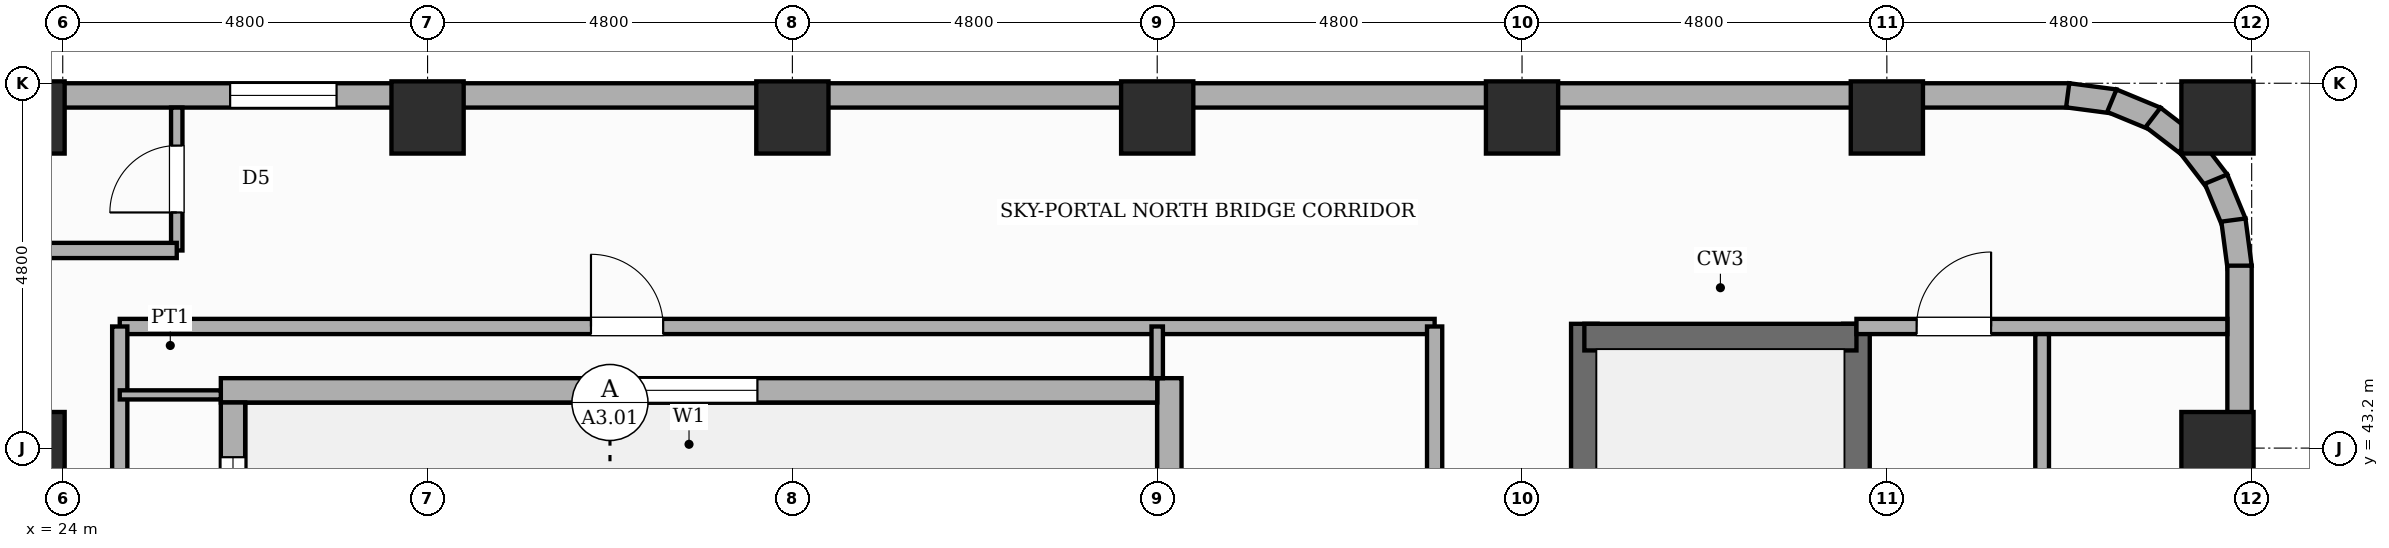
"""IFC4 building model, lengths in metres.
Left out: names, types, materials, properties, quantities, classifications, styles, units other than length and angle.
Written with IfcOpenShell. Run it as: python <this file> out.ifc"""

import sys

from ifc_helpers import new_model, si_unit, direction, frame, frame_2d, origin, origin_2d, place, context, subcontext, project, spatial, rectangle, extrude, element, fill, save


model = new_model("IFC4")
c1 = context("Model", 3, precision=1e-05, world=origin(), true_north=direction((0.0, 1.0)))
c2 = subcontext(c1, "Body", "Model", "MODEL_VIEW")
j1 = project(units=[si_unit("LENGTHUNIT", "METRE"), si_unit("PLANEANGLEUNIT", "RADIAN")], contexts=[c1])
p1 = place(None, origin())
s1 = spatial("IfcSite", under=j1, at=p1, CompositionType="ELEMENT")
p2 = place(p1, origin())
s2 = spatial("IfcBuilding", under=s1, at=p2, CompositionType="ELEMENT")
p3 = place(p2, frame((0.0, 0.0, 154.0)))
s3 = spatial("IfcBuildingStorey", under=s2, at=p3, CompositionType="ELEMENT", Elevation=154.0)
p4 = place(p3, frame((44.02, 35.865, 0.0), z_axis=(0.0, 0.0, 1.0), x_axis=(0.0, 1.0, 0.0)))
e1 = element("IfcWall", 1, at=p4, inside=s3, PredefinedType="SHEAR", context=c2, shape_type="SweptSolid", body=[
    extrude(rectangle(XDim=8.97, YDim=0.35, at=frame_2d((4.485, 0.0))), origin(), (0.0, 0.0, 1.0), 3.6),
])
p5 = place(p4, frame((0.65, 0.0, 0.0)))
e2 = element("IfcOpeningElement", 2, at=p5, cuts=e1, PredefinedType="OPENING", context=c2, shape_type="SweptSolid", body=[
    extrude(rectangle(XDim=0.95, YDim=2.1, at=frame_2d((0.475, 1.05))), frame((0.0, 0.185, 0.0), z_axis=(0.0, -1.0, 0.0), x_axis=(1.0, 0.0, 0.0)), (0.0, 0.0, 1.0), 0.37),
])
p6 = place(p3, frame((47.6, 35.865, 0.0), z_axis=(0.0, 0.0, 1.0), x_axis=(0.0, 1.0, 0.0)))
e3 = element("IfcWall", 3, at=p6, inside=s3, PredefinedType="SHEAR", context=c2, shape_type="SweptSolid", body=[
    extrude(rectangle(XDim=8.97, YDim=0.35, at=frame_2d((4.485, 0.0))), origin(), (0.0, 0.0, 1.0), 3.6),
])
p7 = place(p3, frame((44.02, 44.66, 0.0), z_axis=(0.0, 0.0, 1.0), x_axis=(1.0, 0.0, 0.0)))
e4 = element("IfcWall", 4, at=p7, inside=s3, PredefinedType="SHEAR", context=c2, shape_type="SweptSolid", body=[
    extrude(rectangle(XDim=3.58, YDim=0.35, at=frame_2d((1.79, 0.0))), origin(), (0.0, 0.0, 1.0), 3.6),
])
for number, where, z_axis, x_axis in (
    (5, (23.55, 43.2, 0.0), (0.0, 0.0, 1.0), (1.0, 0.0, 0.0)),
    (6, (23.55, 47.55, 0.0), (0.0, 0.0, 1.0), (1.0, 0.0, 0.0)),
    (7, (28.8, 47.55, 0.0), (0.0, 0.0, 1.0), (1.0, 0.0, 0.0)),
    (8, (33.6, 47.55, 0.0), (0.0, 0.0, 1.0), (1.0, 0.0, 0.0)),
    (9, (38.4, 47.55, 0.0), (0.0, 0.0, 1.0), (1.0, 0.0, 0.0)),
    (10, (43.2, 47.55, 0.0), (0.0, 0.0, 1.0), (1.0, 0.0, 0.0)),
    (11, (48.0, 47.55, 0.0), (0.0, 0.0, 1.0), (1.0, 0.0, 0.0)),
    (12, (52.35, 43.2, 0.0), (0.0, 0.0, 1.0), (1.0, 0.0, 0.0)),
    (13, (52.35, 47.55, 0.0), (0.0, 0.0, 1.0), (1.0, 0.0, 0.0)),
):
    element("IfcColumn", number, at=place(p3, frame(where, z_axis=z_axis, x_axis=x_axis)), inside=s3, PredefinedType="COLUMN", context=c2, shape_type="SweptSolid", body=[
        extrude(rectangle(XDim=0.95, YDim=0.95, at=origin_2d()), origin(), (0.0, 0.0, 1.0), 3.6),
    ])
p8 = place(p3, frame((7.2, 47.84, 0.0), z_axis=(0.0, 0.0, 1.0), x_axis=(1.0, 0.0, 0.0)))
e14 = element("IfcWall", 14, at=p8, inside=s3, PredefinedType="STANDARD", context=c2, shape_type="SweptSolid", body=[
    extrude(rectangle(XDim=43.2, YDim=0.32, at=frame_2d((21.6, 0.0))), origin(), (0.0, 0.0, 1.0), 2.54),
])
p9 = place(p8, frame((19.002, 0.0, 0.65)))
e15 = element("IfcOpeningElement", 15, at=p9, cuts=e14, PredefinedType="OPENING", context=c2, shape_type="SweptSolid", body=[
    extrude(rectangle(XDim=1.4, YDim=1.1, at=frame_2d((0.7, 0.55))), frame((0.0, 0.17, 0.0), z_axis=(0.0, -1.0, 0.0), x_axis=(1.0, 0.0, 0.0)), (0.0, 0.0, 1.0), 0.34),
])
p10 = place(p8, frame((0.282, 0.0, 0.65)))
e16 = element("IfcOpeningElement", 16, at=p10, cuts=e14, PredefinedType="OPENING", context=c2, shape_type="SweptSolid", body=[
    extrude(rectangle(XDim=1.4, YDim=1.1, at=frame_2d((0.7, 0.55))), frame((0.0, 0.17, 0.0), z_axis=(0.0, -1.0, 0.0), x_axis=(1.0, 0.0, 0.0)), (0.0, 0.0, 1.0), 0.34),
])
p11 = place(p8, frame((5.478, 0.0, 0.45)))
e17 = element("IfcOpeningElement", 17, at=p11, cuts=e14, PredefinedType="OPENING", context=c2, shape_type="SweptSolid", body=[
    extrude(rectangle(XDim=0.95, YDim=1.8, at=frame_2d((0.475, 0.9))), frame((0.0, 0.17, 0.0), z_axis=(0.0, -1.0, 0.0), x_axis=(1.0, 0.0, 0.0)), (0.0, 0.0, 1.0), 0.34),
])
for number, where, z_axis, x_axis in (
    (18, (50.379, 47.841, 0.0), (0.0, 0.0, 1.0), (0.991, -0.131, 0.0)),
    (19, (50.96, 47.771, 0.0), (0.0, 0.0, 1.0), (0.924, -0.383, 0.0)),
    (20, (51.503, 47.552, 0.0), (0.0, 0.0, 1.0), (0.793, -0.609, 0.0)),
    (21, (51.97, 47.2, 0.0), (0.0, 0.0, 1.0), (0.609, -0.793, 0.0)),
    (22, (52.331, 46.739, 0.0), (0.0, 0.0, 1.0), (0.382, -0.924, 0.0)),
    (23, (52.56, 46.2, 0.0), (0.0, 0.0, 1.0), (0.131, -0.991, 0.0)),
):
    element("IfcWall", number, at=place(p3, frame(where, z_axis=z_axis, x_axis=x_axis)), inside=s3, PredefinedType="STANDARD", context=c2, shape_type="SweptSolid", body=[
        extrude(rectangle(XDim=0.626, YDim=0.32, at=frame_2d((0.313, 0.0))), origin(), (0.0, 0.0, 1.0), 2.54),
    ])
p12 = place(p3, frame((52.64, 45.6, 0.0), z_axis=(0.0, 0.0, 1.0), x_axis=(0.0, -1.0, 0.0)))
e24 = element("IfcWall", 24, at=p12, inside=s3, PredefinedType="STANDARD", context=c2, shape_type="SweptSolid", body=[
    extrude(rectangle(XDim=14.4, YDim=0.32, at=frame_2d((7.2, 0.0))), origin(), (0.0, 0.0, 1.0), 2.54),
])
p13 = place(p12, frame((3.75, 0.0, 0.0)))
e25 = element("IfcOpeningElement", 25, at=p13, cuts=e24, PredefinedType="OPENING", context=c2, shape_type="SweptSolid", body=[
    extrude(rectangle(XDim=1.1, YDim=2.15, at=frame_2d((0.55, 1.075))), frame((0.0, 0.17, 0.0), z_axis=(0.0, -1.0, 0.0), x_axis=(1.0, 0.0, 0.0)), (0.0, 0.0, 1.0), 0.34),
])
p14 = place(p12, frame((10.52, 0.0, 0.45)))
e26 = element("IfcOpeningElement", 26, at=p14, cuts=e24, PredefinedType="OPENING", context=c2, shape_type="SweptSolid", body=[
    extrude(rectangle(XDim=0.75, YDim=1.8, at=frame_2d((0.375, 0.9))), frame((0.0, 0.17, 0.0), z_axis=(0.0, -1.0, 0.0), x_axis=(1.0, 0.0, 0.0)), (0.0, 0.0, 1.0), 0.34),
])
p15 = place(p12, frame((5.486, 0.0, 0.45)))
e27 = element("IfcOpeningElement", 27, at=p15, cuts=e24, PredefinedType="OPENING", context=c2, shape_type="SweptSolid", body=[
    extrude(rectangle(XDim=0.95, YDim=1.8, at=frame_2d((0.475, 0.9))), frame((0.0, 0.17, 0.0), z_axis=(0.0, -1.0, 0.0), x_axis=(1.0, 0.0, 0.0)), (0.0, 0.0, 1.0), 0.34),
])
p16 = place(p3, frame((38.56, 28.8, 0.0), z_axis=(0.0, 0.0, 1.0), x_axis=(0.0, 1.0, 0.0)))
e28 = element("IfcWall", 28, at=p16, inside=s3, PredefinedType="STANDARD", context=c2, shape_type="SweptSolid", body=[
    extrude(rectangle(XDim=15.32, YDim=0.32, at=frame_2d((7.66, 0.0))), origin(), (0.0, 0.0, 1.0), 3.36),
])
p17 = place(p16, frame((10.99, 0.0, 0.8)))
e29 = element("IfcOpeningElement", 29, at=p17, cuts=e28, PredefinedType="OPENING", context=c2, shape_type="SweptSolid", body=[
    extrude(rectangle(XDim=1.8, YDim=2.1, at=frame_2d((0.9, 1.05))), frame((0.0, 0.17, 0.0), z_axis=(0.0, -1.0, 0.0), x_axis=(1.0, 0.0, 0.0)), (0.0, 0.0, 1.0), 0.34),
])
p18 = place(p16, frame((3.45, 0.0, 0.8)))
e30 = element("IfcOpeningElement", 30, at=p18, cuts=e28, PredefinedType="OPENING", context=c2, shape_type="SweptSolid", body=[
    extrude(rectangle(XDim=1.8, YDim=2.1, at=frame_2d((0.9, 1.05))), frame((0.0, 0.17, 0.0), z_axis=(0.0, -1.0, 0.0), x_axis=(1.0, 0.0, 0.0)), (0.0, 0.0, 1.0), 0.34),
])
p19 = place(p3, frame((38.4, 43.96, 0.0), z_axis=(0.0, 0.0, 1.0), x_axis=(-1.0, 0.0, 0.0)))
e31 = element("IfcWall", 31, at=p19, inside=s3, PredefinedType="STANDARD", context=c2, shape_type="SweptSolid", body=[
    extrude(rectangle(XDim=12.32, YDim=0.32, at=frame_2d((6.16, 0.0))), origin(), (0.0, 0.0, 1.0), 3.36),
])
p20 = place(p19, frame((5.26, 0.0, 0.8)))
e32 = element("IfcOpeningElement", 32, at=p20, cuts=e31, PredefinedType="OPENING", context=c2, shape_type="SweptSolid", body=[
    extrude(rectangle(XDim=1.8, YDim=2.1, at=frame_2d((0.9, 1.05))), frame((0.0, 0.17, 0.0), z_axis=(0.0, -1.0, 0.0), x_axis=(1.0, 0.0, 0.0)), (0.0, 0.0, 1.0), 0.34),
])
p21 = place(p3, frame((26.24, 43.8, 0.0), z_axis=(0.0, 0.0, 1.0), x_axis=(0.0, -1.0, 0.0)))
e33 = element("IfcWall", 33, at=p21, inside=s3, PredefinedType="STANDARD", context=c2, shape_type="SweptSolid", body=[
    extrude(rectangle(XDim=15.0, YDim=0.32, at=frame_2d((7.5, 0.0))), origin(), (0.0, 0.0, 1.0), 3.36),
])
p22 = place(p21, frame((8.15, 0.0, 0.0)))
e34 = element("IfcOpeningElement", 34, at=p22, cuts=e33, PredefinedType="OPENING", context=c2, shape_type="SweptSolid", body=[
    extrude(rectangle(XDim=1.3, YDim=2.2, at=frame_2d((0.65, 1.1))), frame((0.0, 0.17, 0.0), z_axis=(0.0, -1.0, 0.0), x_axis=(1.0, 0.0, 0.0)), (0.0, 0.0, 1.0), 0.34),
])
p23 = place(p21, frame((4.735, 0.0, 0.8)))
e35 = element("IfcOpeningElement", 35, at=p23, cuts=e33, PredefinedType="OPENING", context=c2, shape_type="SweptSolid", body=[
    extrude(rectangle(XDim=1.8, YDim=2.1, at=frame_2d((0.9, 1.05))), frame((0.0, 0.17, 0.0), z_axis=(0.0, -1.0, 0.0), x_axis=(1.0, 0.0, 0.0)), (0.0, 0.0, 1.0), 0.34),
])
p24 = place(p21, frame((0.72, 0.0, 0.8)))
e36 = element("IfcOpeningElement", 36, at=p24, cuts=e33, PredefinedType="OPENING", context=c2, shape_type="SweptSolid", body=[
    extrude(rectangle(XDim=1.8, YDim=2.1, at=frame_2d((0.9, 1.05))), frame((0.0, 0.17, 0.0), z_axis=(0.0, -1.0, 0.0), x_axis=(1.0, 0.0, 0.0)), (0.0, 0.0, 1.0), 0.34),
])
p25 = place(p3, frame((25.5, 45.8, 0.0), z_axis=(0.0, 0.0, 1.0), x_axis=(0.0, 1.0, 0.0)))
e37 = element("IfcWall", 37, at=p25, inside=s3, PredefinedType="PARTITIONING", context=c2, shape_type="SweptSolid", body=[
    extrude(rectangle(XDim=1.88, YDim=0.15, at=frame_2d((0.94, 0.0))), origin(), (0.0, 0.0, 1.0), 3.36),
])
p26 = place(p25, frame((0.5, 0.0, 0.0)))
e38 = element("IfcOpeningElement", 38, at=p26, cuts=e37, PredefinedType="OPENING", context=c2, shape_type="SweptSolid", body=[
    extrude(rectangle(XDim=0.88, YDim=2.1, at=frame_2d((0.44, 1.05))), frame((0.0, 0.085, 0.0), z_axis=(0.0, -1.0, 0.0), x_axis=(1.0, 0.0, 0.0)), (0.0, 0.0, 1.0), 0.17),
])
p27 = place(p3, frame((22.75, 45.8, 0.0), z_axis=(0.0, 0.0, 1.0), x_axis=(1.0, 0.0, 0.0)))
e39 = element("IfcWall", 39, at=p27, inside=s3, PredefinedType="PARTITIONING", context=c2, shape_type="SweptSolid", body=[
    extrude(rectangle(XDim=2.75, YDim=0.2, at=frame_2d((1.375, 0.0))), origin(), (0.0, 0.0, 1.0), 3.36),
])
p28 = place(p3, frame((24.75, 44.8, 0.0), z_axis=(0.0, 0.0, 1.0), x_axis=(1.0, 0.0, 0.0)))
e40 = element("IfcWall", 40, at=p28, inside=s3, PredefinedType="PARTITIONING", context=c2, shape_type="SweptSolid", body=[
    extrude(rectangle(XDim=17.3, YDim=0.2, at=frame_2d((8.65, 0.0))), origin(), (0.0, 0.0, 1.0), 3.36),
])
p29 = place(p28, frame((6.2, 0.0, 0.0)))
e41 = element("IfcOpeningElement", 41, at=p29, cuts=e40, PredefinedType="OPENING", context=c2, shape_type="SweptSolid", body=[
    extrude(rectangle(XDim=0.95, YDim=2.15, at=frame_2d((0.475, 1.075))), frame((0.0, 0.11, 0.0), z_axis=(0.0, -1.0, 0.0), x_axis=(1.0, 0.0, 0.0)), (0.0, 0.0, 1.0), 0.22),
])
p30 = place(p3, frame((38.4, 44.12, 0.0), z_axis=(0.0, 0.0, 1.0), x_axis=(0.0, 1.0, 0.0)))
e42 = element("IfcWall", 42, at=p30, inside=s3, PredefinedType="PARTITIONING", context=c2, shape_type="SweptSolid", body=[
    extrude(rectangle(XDim=0.68, YDim=0.15, at=frame_2d((0.34, 0.0))), origin(), (0.0, 0.0, 1.0), 3.36),
])
p31 = place(p3, frame((47.6, 44.8, 0.0), z_axis=(0.0, 0.0, 1.0), x_axis=(1.0, 0.0, 0.0)))
e43 = element("IfcWall", 43, at=p31, inside=s3, PredefinedType="PARTITIONING", context=c2, shape_type="SweptSolid", body=[
    extrude(rectangle(XDim=4.88, YDim=0.2, at=frame_2d((2.44, 0.0))), origin(), (0.0, 0.0, 1.0), 3.36),
])
p32 = place(p31, frame((0.792, 0.0, 0.0)))
e44 = element("IfcOpeningElement", 44, at=p32, cuts=e43, PredefinedType="OPENING", context=c2, shape_type="SweptSolid", body=[
    extrude(rectangle(XDim=0.98, YDim=2.18, at=frame_2d((0.49, 1.09))), frame((0.0, 0.11, 0.0), z_axis=(0.0, -1.0, 0.0), x_axis=(1.0, 0.0, 0.0)), (0.0, 0.0, 1.0), 0.22),
])
p33 = place(p3, frame((24.75, 40.6, 0.0), z_axis=(0.0, 0.0, 1.0), x_axis=(0.0, 1.0, 0.0)))
e45 = element("IfcWall", 45, at=p33, inside=s3, PredefinedType="PARTITIONING", context=c2, shape_type="SweptSolid", body=[
    extrude(rectangle(XDim=4.2, YDim=0.2, at=frame_2d((2.1, 0.0))), origin(), (0.0, 0.0, 1.0), 3.36),
])
p34 = place(p33, frame((1.0, 0.0, 0.0)))
e46 = element("IfcOpeningElement", 46, at=p34, cuts=e45, PredefinedType="OPENING", context=c2, shape_type="SweptSolid", body=[
    extrude(rectangle(XDim=0.86, YDim=2.1, at=frame_2d((0.43, 1.05))), frame((0.0, 0.11, 0.0), z_axis=(0.0, -1.0, 0.0), x_axis=(1.0, 0.0, 0.0)), (0.0, 0.0, 1.0), 0.22),
])
p35 = place(p3, frame((24.75, 43.9, 0.0), z_axis=(0.0, 0.0, 1.0), x_axis=(1.0, 0.0, 0.0)))
e47 = element("IfcWall", 47, at=p35, inside=s3, PredefinedType="PARTITIONING", context=c2, shape_type="SweptSolid", body=[
    extrude(rectangle(XDim=1.33, YDim=0.12, at=frame_2d((0.665, 0.0))), origin(), (0.0, 0.0, 1.0), 3.36),
])
p36 = place(p3, frame((42.05, 36.05, 0.0), z_axis=(0.0, 0.0, 1.0), x_axis=(0.0, 1.0, 0.0)))
e48 = element("IfcWall", 48, at=p36, inside=s3, PredefinedType="PARTITIONING", context=c2, shape_type="SweptSolid", body=[
    extrude(rectangle(XDim=8.75, YDim=0.2, at=frame_2d((4.375, 0.0))), origin(), (0.0, 0.0, 1.0), 3.36),
])
p37 = place(p36, frame((2.2, 0.0, 0.0)))
e49 = element("IfcOpeningElement", 49, at=p37, cuts=e48, PredefinedType="OPENING", context=c2, shape_type="SweptSolid", body=[
    extrude(rectangle(XDim=0.95, YDim=2.15, at=frame_2d((0.475, 1.075))), frame((0.0, 0.11, 0.0), z_axis=(0.0, -1.0, 0.0), x_axis=(1.0, 0.0, 0.0)), (0.0, 0.0, 1.0), 0.22),
])
p38 = place(p3, frame((50.043, 29.12, 0.0), z_axis=(0.0, 0.0, 1.0), x_axis=(0.0, 1.0, 0.0)))
e50 = element("IfcWall", 50, at=p38, inside=s3, PredefinedType="PLUMBINGWALL", context=c2, shape_type="SweptSolid", body=[
    extrude(rectangle(XDim=15.58, YDim=0.18, at=frame_2d((7.79, 0.0))), origin(), (0.0, 0.0, 1.0), 3.36),
])
p39 = place(p38, frame((2.183, 0.0, 0.0)))
e51 = element("IfcOpeningElement", 51, at=p39, cuts=e50, PredefinedType="OPENING", context=c2, shape_type="SweptSolid", body=[
    extrude(rectangle(XDim=0.9, YDim=2.15, at=frame_2d((0.45, 1.075))), frame((0.0, 0.1, 0.0), z_axis=(0.0, -1.0, 0.0), x_axis=(1.0, 0.0, 0.0)), (0.0, 0.0, 1.0), 0.2),
])
p40 = place(p38, frame((7.959, 0.0, 0.0)))
e52 = element("IfcOpeningElement", 52, at=p40, cuts=e50, PredefinedType="OPENING", context=c2, shape_type="SweptSolid", body=[
    extrude(rectangle(XDim=0.9, YDim=2.15, at=frame_2d((0.45, 1.075))), frame((0.0, 0.1, 0.0), z_axis=(0.0, -1.0, 0.0), x_axis=(1.0, 0.0, 0.0)), (0.0, 0.0, 1.0), 0.2),
])
p41 = place(p38, frame((12.711, 0.0, 0.0)))
e53 = element("IfcOpeningElement", 53, at=p41, cuts=e50, PredefinedType="OPENING", context=c2, shape_type="SweptSolid", body=[
    extrude(rectangle(XDim=0.86, YDim=2.1, at=frame_2d((0.43, 1.05))), frame((0.0, 0.1, 0.0), z_axis=(0.0, -1.0, 0.0), x_axis=(1.0, 0.0, 0.0)), (0.0, 0.0, 1.0), 0.2),
])
p42 = place(p9, origin())
e54 = element("IfcWindow", 54, at=p42, inside=s3, PartitioningType="SINGLE_PANEL", PredefinedType="WINDOW", context=c2, shape_type="SweptSolid", body=[
    extrude(rectangle(XDim=1.4, YDim=1.1, at=frame_2d((0.7, 0.55))), frame((0.0, 0.03, 0.0), z_axis=(0.0, -1.0, 0.0), x_axis=(1.0, 0.0, 0.0)), (0.0, 0.0, 1.0), 0.06),
])
fill(e15, e54)
p43 = place(p20, origin())
e55 = element("IfcWindow", 55, at=p43, inside=s3, PartitioningType="SINGLE_PANEL", PredefinedType="WINDOW", context=c2, shape_type="SweptSolid", body=[
    extrude(rectangle(XDim=1.8, YDim=2.1, at=frame_2d((0.9, 1.05))), frame((0.0, 0.03, 0.0), z_axis=(0.0, -1.0, 0.0), x_axis=(1.0, 0.0, 0.0)), (0.0, 0.0, 1.0), 0.06),
])
fill(e32, e55)
p44 = place(p24, origin())
e56 = element("IfcWindow", 56, at=p44, inside=s3, PartitioningType="SINGLE_PANEL", PredefinedType="WINDOW", context=c2, shape_type="SweptSolid", body=[
    extrude(rectangle(XDim=1.8, YDim=2.1, at=frame_2d((0.9, 1.05))), frame((0.0, 0.03, 0.0), z_axis=(0.0, -1.0, 0.0), x_axis=(1.0, 0.0, 0.0)), (0.0, 0.0, 1.0), 0.06),
])
fill(e36, e56)
p45 = place(p26, origin())
e57 = element("IfcDoor", 57, at=p45, inside=s3, OperationType="SINGLE_SWING_LEFT", PredefinedType="DOOR", context=c2, shape_type="SweptSolid", body=[
    extrude(rectangle(XDim=0.88, YDim=2.1, at=frame_2d((0.44, 1.05))), frame((0.0, 0.025, 0.0), z_axis=(0.0, -1.0, 0.0), x_axis=(1.0, 0.0, 0.0)), (0.0, 0.0, 1.0), 0.05),
])
fill(e38, e57)
p46 = place(p29, origin())
e58 = element("IfcDoor", 58, at=p46, inside=s3, OperationType="SINGLE_SWING_LEFT", PredefinedType="DOOR", context=c2, shape_type="SweptSolid", body=[
    extrude(rectangle(XDim=0.95, YDim=2.15, at=frame_2d((0.475, 1.075))), frame((0.0, 0.025, 0.0), z_axis=(0.0, -1.0, 0.0), x_axis=(1.0, 0.0, 0.0)), (0.0, 0.0, 1.0), 0.05),
])
fill(e41, e58)
p47 = place(p32, origin())
e59 = element("IfcDoor", 59, at=p47, inside=s3, OperationType="SINGLE_SWING_RIGHT", PredefinedType="DOOR", context=c2, shape_type="SweptSolid", body=[
    extrude(rectangle(XDim=0.98, YDim=2.18, at=frame_2d((0.49, 1.09))), frame((0.0, 0.025, 0.0), z_axis=(0.0, -1.0, 0.0), x_axis=(1.0, 0.0, 0.0)), (0.0, 0.0, 1.0), 0.05),
])
fill(e44, e59)
save(model, sys.argv[1])
